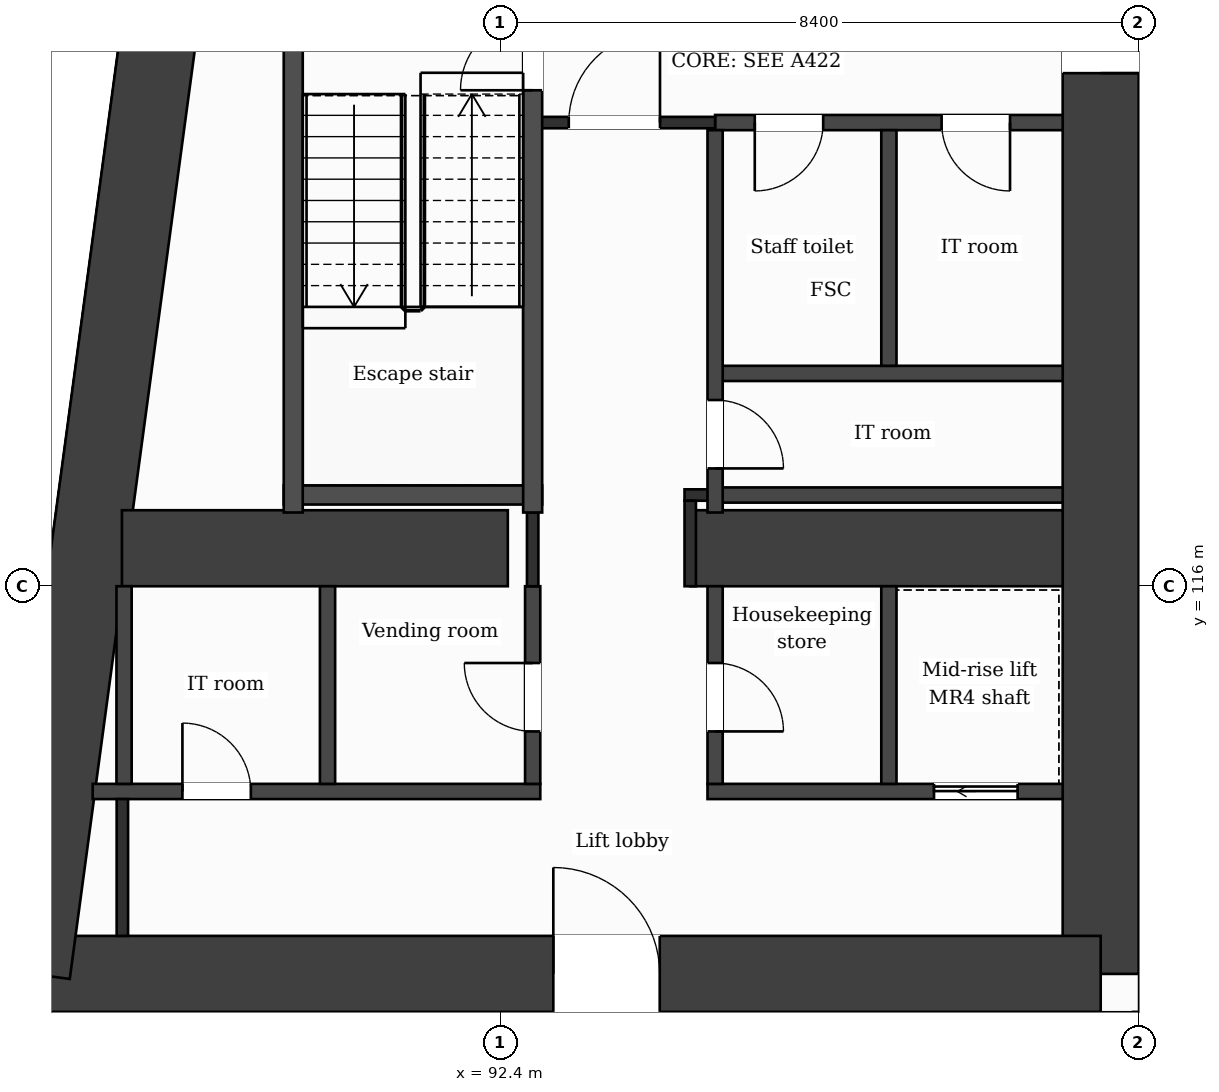
"""IFC4 building model, lengths in metres.
Left out: names, types, materials, properties, quantities, classifications, styles, units other than length and angle.
Written with IfcOpenShell. Run it as: python <this file> out.ifc"""

import sys

from ifc_helpers import new_model, si_unit, direction, frame, frame_2d, origin, place, context, subcontext, project, spatial, rectangle, extrude, element, fill, save


model = new_model("IFC4")
c1 = context("Model", 3, precision=1e-05, world=origin(), true_north=direction((0.0, 1.0)))
c2 = subcontext(c1, "Body", "Model", "MODEL_VIEW")
j1 = project(units=[si_unit("LENGTHUNIT", "METRE"), si_unit("PLANEANGLEUNIT", "RADIAN")], contexts=[c1])
p1 = place(None, origin())
s1 = spatial("IfcSite", under=j1, at=p1, CompositionType="ELEMENT")
p2 = place(p1, origin())
s2 = spatial("IfcBuilding", under=s1, at=p2, CompositionType="ELEMENT")
p3 = place(p2, frame((0.0, 0.0, 94.7)))
s3 = spatial("IfcBuildingStorey", under=s2, at=p3, CompositionType="ELEMENT", Elevation=94.7)
p4 = place(p3, frame((100.3, 131.9, 0.0), z_axis=(0.0, 0.0, 1.0), x_axis=(0.0, -1.0, 0.0)))
e1 = element("IfcWall", 1, at=p4, inside=s3, PredefinedType="SHEAR", context=c2, shape_type="SweptSolid", body=[
    extrude(rectangle(XDim=21.0, YDim=1.0, at=frame_2d((10.5, 0.0))), origin(), (0.0, 0.0, 1.0), 3.7),
])
p5 = place(p4, frame((7.75, 0.0, 0.0)))
e2 = element("IfcOpeningElement", 2, at=p5, cuts=e1, PredefinedType="OPENING", context=c2, shape_type="SweptSolid", body=[
    extrude(rectangle(XDim=1.4, YDim=2.1, at=frame_2d((0.7, 1.05))), frame((0.0, 0.51, 0.0), z_axis=(0.0, -1.0, 0.0), x_axis=(1.0, 0.0, 0.0)), (0.0, 0.0, 1.0), 1.02),
])
p6 = place(p3, frame((100.3, 110.9, 0.0), z_axis=(0.0, 0.0, 1.0), x_axis=(-1.0, 0.0, 0.0)))
e3 = element("IfcWall", 3, at=p6, inside=s3, PredefinedType="SHEAR", context=c2, shape_type="SweptSolid", body=[
    extrude(rectangle(XDim=14.059, YDim=1.0, at=frame_2d((7.03, 0.0))), origin(), (0.0, 0.0, 1.0), 3.7),
])
p7 = place(p6, frame((5.802, 0.0, 0.0)))
e4 = element("IfcOpeningElement", 4, at=p7, cuts=e3, PredefinedType="OPENING", context=c2, shape_type="SweptSolid", body=[
    extrude(rectangle(XDim=1.4, YDim=2.1, at=frame_2d((0.7, 1.05))), frame((0.0, 0.51, 0.0), z_axis=(0.0, -1.0, 0.0), x_axis=(1.0, 0.0, 0.0)), (0.0, 0.0, 1.0), 1.02),
])
p8 = place(p3, frame((86.241, 110.9, 0.0), z_axis=(0.0, 0.0, 1.0), x_axis=(0.133411141623, 0.991060778808, 0.0)))
e5 = element("IfcWall", 5, at=p8, inside=s3, PredefinedType="SHEAR", context=c2, shape_type="SweptSolid", body=[
    extrude(rectangle(XDim=21.189, YDim=1.0, at=frame_2d((10.595, 0.0))), origin(), (0.0, 0.0, 1.0), 3.7),
])
p9 = place(p3, frame((87.423, 116.5, 0.0), z_axis=(0.0, 0.0, 1.0), x_axis=(1.0, 0.0, 0.0)))
e6 = element("IfcWall", 6, at=p9, inside=s3, PredefinedType="SHEAR", context=c2, shape_type="SweptSolid", body=[
    extrude(rectangle(XDim=5.077, YDim=1.0, at=frame_2d((2.539, 0.0))), origin(), (0.0, 0.0, 1.0), 3.7),
])
p10 = place(p3, frame((94.9, 116.5, 0.0), z_axis=(0.0, 0.0, 1.0), x_axis=(1.0, 0.0, 0.0)))
e7 = element("IfcWall", 7, at=p10, inside=s3, PredefinedType="SHEAR", context=c2, shape_type="SweptSolid", body=[
    extrude(rectangle(XDim=4.9, YDim=1.0, at=frame_2d((2.45, 0.0))), origin(), (0.0, 0.0, 1.0), 3.7),
])
p11 = place(p3, frame((87.334, 110.4, 0.0), z_axis=(0.0, 0.0, 1.0), x_axis=(-0.133437175554, -0.991057273915, 0.0)))
e8 = element("IfcWall", 8, at=p11, inside=s3, PredefinedType="SOLIDWALL", context=c2, shape_type="SweptSolid", body=[
    extrude(rectangle(XDim=6.781, YDim=0.3, at=frame_2d((3.39, 0.0))), origin(), (0.0, 0.0, 1.0), 3.38),
])
p12 = place(p11, frame((1.418, 0.0, 0.0)))
e9 = element("IfcOpeningElement", 9, at=p12, cuts=e8, PredefinedType="OPENING", context=c2, shape_type="SweptSolid", body=[
    extrude(rectangle(XDim=1.2, YDim=2.4, at=frame_2d((0.6, 1.2))), frame((0.0, 0.16, 0.0), z_axis=(0.0, -1.0, 0.0), x_axis=(1.0, 0.0, 0.0)), (0.0, 0.0, 1.0), 0.32),
])
p13 = place(p11, frame((4.758, 0.0, 0.9)))
e10 = element("IfcOpeningElement", 10, at=p13, cuts=e8, PredefinedType="OPENING", context=c2, shape_type="SweptSolid", body=[
    extrude(rectangle(XDim=1.2, YDim=2.1, at=frame_2d((0.6, 1.05))), frame((0.0, 0.16, 0.0), z_axis=(0.0, -1.0, 0.0), x_axis=(1.0, 0.0, 0.0)), (0.0, 0.0, 1.0), 0.32),
])
p14 = place(p3, frame((87.039, 113.3, 0.0), z_axis=(0.0, 0.0, 1.0), x_axis=(1.0, 0.0, 0.0)))
e11 = element("IfcWall", 11, at=p14, inside=s3, PredefinedType="PARTITIONING", context=c2, shape_type="SweptSolid", body=[
    extrude(rectangle(XDim=5.888, YDim=0.2, at=frame_2d((2.944, 0.0))), origin(), (0.0, 0.0, 1.0), 3.38),
])
p15 = place(p14, frame((1.18, 0.0, 0.0)))
e12 = element("IfcOpeningElement", 12, at=p15, cuts=e11, PredefinedType="OPENING", context=c2, shape_type="SweptSolid", body=[
    extrude(rectangle(XDim=0.9, YDim=2.1, at=frame_2d((0.45, 1.05))), frame((0.0, 0.11, 0.0), z_axis=(0.0, -1.0, 0.0), x_axis=(1.0, 0.0, 0.0)), (0.0, 0.0, 1.0), 0.22),
])
p16 = place(p3, frame((95.127, 113.3, 0.0), z_axis=(0.0, 0.0, 1.0), x_axis=(1.0, 0.0, 0.0)))
e13 = element("IfcWall", 13, at=p16, inside=s3, PredefinedType="PARTITIONING", context=c2, shape_type="SweptSolid", body=[
    extrude(rectangle(XDim=4.673, YDim=0.2, at=frame_2d((2.336, 0.0))), origin(), (0.0, 0.0, 1.0), 3.38),
])
p17 = place(p16, frame((2.98, 0.0, 0.0)))
e14 = element("IfcOpeningElement", 14, at=p17, cuts=e13, PredefinedType="OPENING", context=c2, shape_type="SweptSolid", body=[
    extrude(rectangle(XDim=1.1, YDim=2.1, at=frame_2d((0.55, 1.05))), frame((0.0, 0.11, 0.0), z_axis=(0.0, -1.0, 0.0), x_axis=(1.0, 0.0, 0.0)), (0.0, 0.0, 1.0), 0.22),
])
p18 = place(p3, frame((95.227, 117.2, 0.0), z_axis=(0.0, 0.0, 1.0), x_axis=(1.0, 0.0, 0.0)))
e15 = element("IfcWall", 15, at=p18, inside=s3, PredefinedType="PARTITIONING", context=c2, shape_type="SweptSolid", body=[
    extrude(rectangle(XDim=4.573, YDim=0.2, at=frame_2d((2.287, 0.0))), origin(), (0.0, 0.0, 1.0), 3.38),
])
p19 = place(p3, frame((94.825, 117.2, 0.0), z_axis=(0.0, 0.0, 1.0), x_axis=(1.0, 0.0, 0.0)))
e16 = element("IfcWall", 16, at=p19, inside=s3, PredefinedType="PARTITIONING", context=c2, shape_type="SweptSolid", body=[
    extrude(rectangle(XDim=0.402, YDim=0.15, at=frame_2d((0.201, 0.0))), origin(), (0.0, 0.0, 1.0), 3.38),
])
p20 = place(p3, frame((89.552, 117.2, 0.0), z_axis=(0.0, 0.0, 1.0), x_axis=(1.0, 0.0, 0.0)))
e17 = element("IfcWall", 17, at=p20, inside=s3, PredefinedType="PARTITIONING", context=c2, shape_type="SweptSolid", body=[
    extrude(rectangle(XDim=3.4, YDim=0.25, at=frame_2d((1.7, 0.0))), origin(), (0.0, 0.0, 1.0), 3.38),
])
p21 = place(p3, frame((95.227, 118.8, 0.0), z_axis=(0.0, 0.0, 1.0), x_axis=(1.0, 0.0, 0.0)))
e18 = element("IfcWall", 18, at=p21, inside=s3, PredefinedType="PARTITIONING", context=c2, shape_type="SweptSolid", body=[
    extrude(rectangle(XDim=4.573, YDim=0.2, at=frame_2d((2.287, 0.0))), origin(), (0.0, 0.0, 1.0), 3.38),
])
p22 = place(p3, frame((95.227, 122.1, 0.0), z_axis=(0.0, 0.0, 1.0), x_axis=(1.0, 0.0, 0.0)))
e19 = element("IfcWall", 19, at=p22, inside=s3, PredefinedType="PARTITIONING", context=c2, shape_type="SweptSolid", body=[
    extrude(rectangle(XDim=4.573, YDim=0.2, at=frame_2d((2.287, 0.0))), origin(), (0.0, 0.0, 1.0), 3.38),
])
p23 = place(p22, frame((0.522, 0.0, 0.0)))
e20 = element("IfcOpeningElement", 20, at=p23, cuts=e19, PredefinedType="OPENING", context=c2, shape_type="SweptSolid", body=[
    extrude(rectangle(XDim=0.9, YDim=2.1, at=frame_2d((0.45, 1.05))), frame((0.0, 0.11, 0.0), z_axis=(0.0, -1.0, 0.0), x_axis=(1.0, 0.0, 0.0)), (0.0, 0.0, 1.0), 0.22),
])
p24 = place(p22, frame((2.98, 0.0, 0.0)))
e21 = element("IfcOpeningElement", 21, at=p24, cuts=e19, PredefinedType="OPENING", context=c2, shape_type="SweptSolid", body=[
    extrude(rectangle(XDim=0.9, YDim=2.1, at=frame_2d((0.45, 1.05))), frame((0.0, 0.11, 0.0), z_axis=(0.0, -1.0, 0.0), x_axis=(1.0, 0.0, 0.0)), (0.0, 0.0, 1.0), 0.22),
])
p25 = place(p3, frame((92.827, 122.1, 0.0), z_axis=(0.0, 0.0, 1.0), x_axis=(1.0, 0.0, 0.0)))
e22 = element("IfcWall", 22, at=p25, inside=s3, PredefinedType="PARTITIONING", context=c2, shape_type="SweptSolid", body=[
    extrude(rectangle(XDim=2.4, YDim=0.15, at=frame_2d((1.2, 0.0))), origin(), (0.0, 0.0, 1.0), 3.38),
])
p26 = place(p25, frame((0.475, 0.0, 0.0)))
e23 = element("IfcOpeningElement", 23, at=p26, cuts=e22, PredefinedType="OPENING", context=c2, shape_type="SweptSolid", body=[
    extrude(rectangle(XDim=1.2, YDim=2.1, at=frame_2d((0.6, 1.05))), frame((0.0, 0.085, 0.0), z_axis=(0.0, -1.0, 0.0), x_axis=(1.0, 0.0, 0.0)), (0.0, 0.0, 1.0), 0.17),
])
p27 = place(p3, frame((87.451, 113.4, 0.0), z_axis=(0.0, 0.0, 1.0), x_axis=(0.0, 1.0, 0.0)))
e24 = element("IfcWall", 24, at=p27, inside=s3, PredefinedType="PARTITIONING", context=c2, shape_type="SweptSolid", body=[
    extrude(rectangle(XDim=2.6, YDim=0.2, at=frame_2d((1.3, 0.0))), origin(), (0.0, 0.0, 1.0), 3.38),
])
p28 = place(p3, frame((87.429, 111.4, 0.0), z_axis=(0.0, 0.0, 1.0), x_axis=(0.0, 1.0, 0.0)))
e25 = element("IfcWall", 25, at=p28, inside=s3, PredefinedType="PARTITIONING", context=c2, shape_type="SweptSolid", body=[
    extrude(rectangle(XDim=1.8, YDim=0.15, at=frame_2d((0.9, 0.0))), origin(), (0.0, 0.0, 1.0), 3.38),
])
p29 = place(p3, frame((89.677, 116.97, 0.0), z_axis=(0.0, 0.0, 1.0), x_axis=(0.0, 1.0, 0.0)))
e26 = element("IfcWall", 26, at=p29, inside=s3, PredefinedType="PARTITIONING", context=c2, shape_type="SweptSolid", body=[
    extrude(rectangle(XDim=6.855, YDim=0.25, at=frame_2d((3.427, 0.0))), origin(), (0.0, 0.0, 1.0), 3.38),
])
p30 = place(p3, frame((90.128, 113.4, 0.0), z_axis=(0.0, 0.0, 1.0), x_axis=(0.0, 1.0, 0.0)))
e27 = element("IfcWall", 27, at=p30, inside=s3, PredefinedType="PARTITIONING", context=c2, shape_type="SweptSolid", body=[
    extrude(rectangle(XDim=2.6, YDim=0.2, at=frame_2d((1.3, 0.0))), origin(), (0.0, 0.0, 1.0), 3.38),
])
p31 = place(p3, frame((92.827, 113.4, 0.0), z_axis=(0.0, 0.0, 1.0), x_axis=(0.0, 1.0, 0.0)))
e28 = element("IfcWall", 28, at=p31, inside=s3, PredefinedType="PARTITIONING", context=c2, shape_type="SweptSolid", body=[
    extrude(rectangle(XDim=2.6, YDim=0.2, at=frame_2d((1.3, 0.0))), origin(), (0.0, 0.0, 1.0), 3.38),
])
p32 = place(p31, frame((0.69, 0.0, 0.0)))
e29 = element("IfcOpeningElement", 29, at=p32, cuts=e28, PredefinedType="OPENING", context=c2, shape_type="SweptSolid", body=[
    extrude(rectangle(XDim=0.9, YDim=2.1, at=frame_2d((0.45, 1.05))), frame((0.0, 0.11, 0.0), z_axis=(0.0, -1.0, 0.0), x_axis=(1.0, 0.0, 0.0)), (0.0, 0.0, 1.0), 0.22),
])
p33 = place(p3, frame((92.827, 116.0, 0.0), z_axis=(0.0, 0.0, 1.0), x_axis=(0.0, 1.0, 0.0)))
e30 = element("IfcWall", 30, at=p33, inside=s3, PredefinedType="PARTITIONING", context=c2, shape_type="SweptSolid", body=[
    extrude(rectangle(XDim=0.97, YDim=0.15, at=frame_2d((0.485, 0.0))), origin(), (0.0, 0.0, 1.0), 3.38),
])
p34 = place(p3, frame((92.827, 116.97, 0.0), z_axis=(0.0, 0.0, 1.0), x_axis=(0.0, 1.0, 0.0)))
e31 = element("IfcWall", 31, at=p34, inside=s3, PredefinedType="PARTITIONING", context=c2, shape_type="SweptSolid", body=[
    extrude(rectangle(XDim=6.855, YDim=0.25, at=frame_2d((3.427, 0.0))), origin(), (0.0, 0.0, 1.0), 3.38),
])
p35 = place(p34, frame((5.555, 0.0, 0.0)))
e32 = element("IfcOpeningElement", 32, at=p35, cuts=e31, PredefinedType="OPENING", context=c2, shape_type="SweptSolid", body=[
    extrude(rectangle(XDim=0.95, YDim=2.1, at=frame_2d((0.475, 1.05))), frame((0.0, 0.135, 0.0), z_axis=(0.0, -1.0, 0.0), x_axis=(1.0, 0.0, 0.0)), (0.0, 0.0, 1.0), 0.27),
])
p36 = place(p3, frame((94.9, 116.0, 0.0), z_axis=(0.0, 0.0, 1.0), x_axis=(0.0, 1.0, 0.0)))
e33 = element("IfcWall", 33, at=p36, inside=s3, PredefinedType="PARTITIONING", context=c2, shape_type="SweptSolid", body=[
    extrude(rectangle(XDim=1.125, YDim=0.15, at=frame_2d((0.562, 0.0))), origin(), (0.0, 0.0, 1.0), 3.38),
])
p37 = place(p3, frame((95.227, 113.4, 0.0), z_axis=(0.0, 0.0, 1.0), x_axis=(0.0, 1.0, 0.0)))
e34 = element("IfcWall", 34, at=p37, inside=s3, PredefinedType="PARTITIONING", context=c2, shape_type="SweptSolid", body=[
    extrude(rectangle(XDim=2.6, YDim=0.2, at=frame_2d((1.3, 0.0))), origin(), (0.0, 0.0, 1.0), 3.38),
])
p38 = place(p37, frame((0.69, 0.0, 0.0)))
e35 = element("IfcOpeningElement", 35, at=p38, cuts=e34, PredefinedType="OPENING", context=c2, shape_type="SweptSolid", body=[
    extrude(rectangle(XDim=0.9, YDim=2.1, at=frame_2d((0.45, 1.05))), frame((0.0, 0.11, 0.0), z_axis=(0.0, -1.0, 0.0), x_axis=(1.0, 0.0, 0.0)), (0.0, 0.0, 1.0), 0.22),
])
p39 = place(p3, frame((95.227, 116.97, 0.0), z_axis=(0.0, 0.0, 1.0), x_axis=(0.0, 1.0, 0.0)))
e36 = element("IfcWall", 36, at=p39, inside=s3, PredefinedType="PARTITIONING", context=c2, shape_type="SweptSolid", body=[
    extrude(rectangle(XDim=5.03, YDim=0.2, at=frame_2d((2.515, 0.0))), origin(), (0.0, 0.0, 1.0), 3.38),
])
p40 = place(p39, frame((0.58, 0.0, 0.0)))
e37 = element("IfcOpeningElement", 37, at=p40, cuts=e36, PredefinedType="OPENING", context=c2, shape_type="SweptSolid", body=[
    extrude(rectangle(XDim=0.9, YDim=2.1, at=frame_2d((0.45, 1.05))), frame((0.0, 0.11, 0.0), z_axis=(0.0, -1.0, 0.0), x_axis=(1.0, 0.0, 0.0)), (0.0, 0.0, 1.0), 0.22),
])
p41 = place(p3, frame((97.513, 113.4, 0.0), z_axis=(0.0, 0.0, 1.0), x_axis=(0.0, 1.0, 0.0)))
e38 = element("IfcWall", 38, at=p41, inside=s3, PredefinedType="PARTITIONING", context=c2, shape_type="SweptSolid", body=[
    extrude(rectangle(XDim=2.6, YDim=0.2, at=frame_2d((1.3, 0.0))), origin(), (0.0, 0.0, 1.0), 3.38),
])
p42 = place(p3, frame((97.513, 118.9, 0.0), z_axis=(0.0, 0.0, 1.0), x_axis=(0.0, 1.0, 0.0)))
e39 = element("IfcWall", 39, at=p42, inside=s3, PredefinedType="PARTITIONING", context=c2, shape_type="SweptSolid", body=[
    extrude(rectangle(XDim=3.1, YDim=0.2, at=frame_2d((1.55, 0.0))), origin(), (0.0, 0.0, 1.0), 3.38),
])
p43 = place(p3, frame((100.8, 109.075, 0.0), z_axis=(0.0, 0.0, 1.0), x_axis=(0.0, 1.0, 0.0)))
e40 = element("IfcWall", 40, at=p43, inside=s3, PredefinedType="PARTITIONING", context=c2, shape_type="SweptSolid", body=[
    extrude(rectangle(XDim=1.325, YDim=0.15, at=frame_2d((0.663, 0.0))), origin(), (0.0, 0.0, 1.0), 3.38),
])
p44 = place(p26, origin())
e41 = element("IfcDoor", 41, at=p44, inside=s3, OperationType="SINGLE_SWING_RIGHT", PredefinedType="DOOR", context=c2, shape_type="SweptSolid", body=[
    extrude(rectangle(XDim=1.2, YDim=2.1, at=frame_2d((0.6, 1.05))), frame((0.0, 0.025, 0.0), z_axis=(0.0, -1.0, 0.0), x_axis=(1.0, 0.0, 0.0)), (0.0, 0.0, 1.0), 0.05),
])
fill(e23, e41)
p45 = place(p23, origin())
e42 = element("IfcDoor", 42, at=p45, inside=s3, OperationType="SINGLE_SWING_LEFT", PredefinedType="DOOR", context=c2, shape_type="SweptSolid", body=[
    extrude(rectangle(XDim=0.9, YDim=2.1, at=frame_2d((0.45, 1.05))), frame((0.0, 0.025, 0.0), z_axis=(0.0, -1.0, 0.0), x_axis=(1.0, 0.0, 0.0)), (0.0, 0.0, 1.0), 0.05),
])
fill(e20, e42)
p46 = place(p24, origin())
e43 = element("IfcDoor", 43, at=p46, inside=s3, OperationType="SINGLE_SWING_RIGHT", PredefinedType="DOOR", context=c2, shape_type="SweptSolid", body=[
    extrude(rectangle(XDim=0.9, YDim=2.1, at=frame_2d((0.45, 1.05))), frame((0.0, 0.025, 0.0), z_axis=(0.0, -1.0, 0.0), x_axis=(1.0, 0.0, 0.0)), (0.0, 0.0, 1.0), 0.05),
])
fill(e21, e43)
p47 = place(p35, origin())
e44 = element("IfcDoor", 44, at=p47, inside=s3, OperationType="SINGLE_SWING_LEFT", PredefinedType="DOOR", context=c2, shape_type="SweptSolid", body=[
    extrude(rectangle(XDim=0.95, YDim=2.1, at=frame_2d((0.475, 1.05))), frame((0.0, 0.025, 0.0), z_axis=(0.0, -1.0, 0.0), x_axis=(1.0, 0.0, 0.0)), (0.0, 0.0, 1.0), 0.05),
])
fill(e32, e44)
p48 = place(p40, origin())
e45 = element("IfcDoor", 45, at=p48, inside=s3, OperationType="SINGLE_SWING_LEFT", PredefinedType="DOOR", context=c2, shape_type="SweptSolid", body=[
    extrude(rectangle(XDim=0.9, YDim=2.1, at=frame_2d((0.45, 1.05))), frame((0.0, 0.025, 0.0), z_axis=(0.0, -1.0, 0.0), x_axis=(1.0, 0.0, 0.0)), (0.0, 0.0, 1.0), 0.05),
])
fill(e37, e45)
p49 = place(p17, origin())
e46 = element("IfcDoor", 46, at=p49, inside=s3, OperationType="SLIDING_TO_LEFT", PredefinedType="DOOR", context=c2, shape_type="SweptSolid", body=[
    extrude(rectangle(XDim=1.1, YDim=2.1, at=frame_2d((0.55, 1.05))), frame((0.0, 0.025, 0.0), z_axis=(0.0, -1.0, 0.0), x_axis=(1.0, 0.0, 0.0)), (0.0, 0.0, 1.0), 0.05),
])
fill(e14, e46)
p50 = place(p15, origin())
e47 = element("IfcDoor", 47, at=p50, inside=s3, OperationType="SINGLE_SWING_LEFT", PredefinedType="DOOR", context=c2, shape_type="SweptSolid", body=[
    extrude(rectangle(XDim=0.9, YDim=2.1, at=frame_2d((0.45, 1.05))), frame((0.0, 0.025, 0.0), z_axis=(0.0, -1.0, 0.0), x_axis=(1.0, 0.0, 0.0)), (0.0, 0.0, 1.0), 0.05),
])
fill(e12, e47)
p51 = place(p32, origin())
e48 = element("IfcDoor", 48, at=p51, inside=s3, OperationType="SINGLE_SWING_RIGHT", PredefinedType="DOOR", context=c2, shape_type="SweptSolid", body=[
    extrude(rectangle(XDim=0.9, YDim=2.1, at=frame_2d((0.45, 1.05))), frame((0.0, 0.025, 0.0), z_axis=(0.0, -1.0, 0.0), x_axis=(1.0, 0.0, 0.0)), (0.0, 0.0, 1.0), 0.05),
])
fill(e29, e48)
p52 = place(p38, origin())
e49 = element("IfcDoor", 49, at=p52, inside=s3, OperationType="SINGLE_SWING_LEFT", PredefinedType="DOOR", context=c2, shape_type="SweptSolid", body=[
    extrude(rectangle(XDim=0.9, YDim=2.1, at=frame_2d((0.45, 1.05))), frame((0.0, 0.025, 0.0), z_axis=(0.0, -1.0, 0.0), x_axis=(1.0, 0.0, 0.0)), (0.0, 0.0, 1.0), 0.05),
])
fill(e35, e49)
p53 = place(p7, origin())
e50 = element("IfcDoor", 50, at=p53, inside=s3, OperationType="SINGLE_SWING_RIGHT", PredefinedType="DOOR", context=c2, shape_type="SweptSolid", body=[
    extrude(rectangle(XDim=1.4, YDim=2.1, at=frame_2d((0.7, 1.05))), frame((0.0, 0.025, 0.0), z_axis=(0.0, -1.0, 0.0), x_axis=(1.0, 0.0, 0.0)), (0.0, 0.0, 1.0), 0.05),
])
fill(e4, e50)
p54 = place(p5, origin())
e51 = element("IfcDoor", 51, at=p54, inside=s3, OperationType="SINGLE_SWING_RIGHT", PredefinedType="DOOR", context=c2, shape_type="SweptSolid", body=[
    extrude(rectangle(XDim=1.4, YDim=2.1, at=frame_2d((0.7, 1.05))), frame((0.0, 0.025, 0.0), z_axis=(0.0, -1.0, 0.0), x_axis=(1.0, 0.0, 0.0)), (0.0, 0.0, 1.0), 0.05),
])
fill(e2, e51)
save(model, sys.argv[1])
